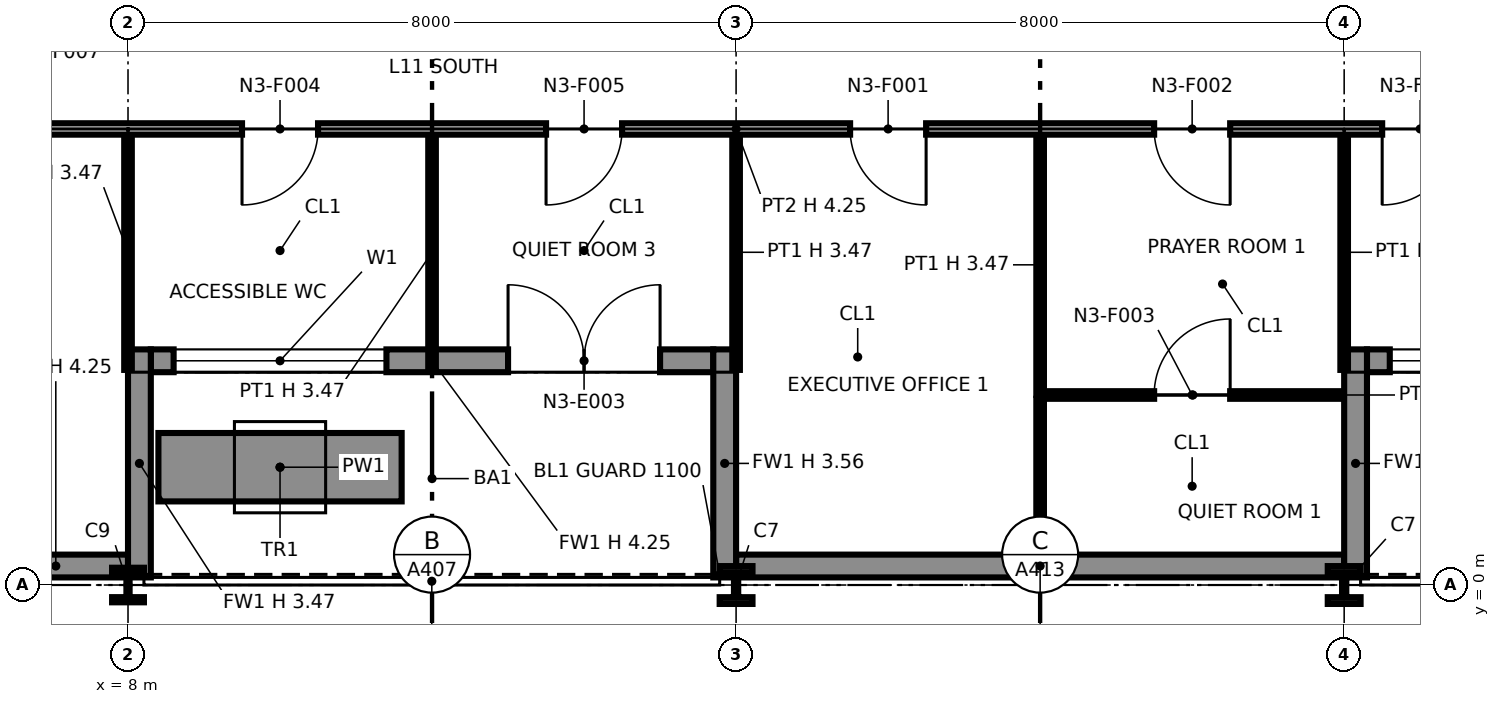
"""IFC4 building model, lengths in metres.
Left out: names, types, materials, properties, quantities, classifications, styles, units other than length and angle.
Written with IfcOpenShell. Run it as: python <this file> out.ifc"""

import sys

from ifc_helpers import new_model, si_unit, direction, frame, frame_2d, origin, origin_2d, place, context, subcontext, project, spatial, rectangle, i_section, extrude, element, fill, save


model = new_model("IFC4")
c1 = context("Model", 3, precision=1e-05, world=origin(), true_north=direction((0.0, 1.0)))
c2 = subcontext(c1, "Body", "Model", "MODEL_VIEW")
j1 = project(units=[si_unit("LENGTHUNIT", "METRE"), si_unit("PLANEANGLEUNIT", "RADIAN")], contexts=[c1])
p1 = place(None, origin())
s1 = spatial("IfcSite", under=j1, at=p1, CompositionType="ELEMENT")
p2 = place(p1, origin())
s2 = spatial("IfcBuilding", under=s1, at=p2, CompositionType="ELEMENT")
p3 = place(p2, frame((0.0, 0.0, 65.6)))
s3 = spatial("IfcBuildingStorey", under=s2, at=p3, CompositionType="ELEMENT", Elevation=65.6)
p4 = place(p3, frame((8.0, 0.0, 0.0), z_axis=(0.0, 0.0, 1.0), x_axis=(1.0, 0.0, 0.0)))
e1 = element("IfcColumn", 1, at=p4, inside=s3, PredefinedType="COLUMN", context=c2, shape_type="SweptSolid", body=[
    extrude(i_section(OverallWidth=0.419, OverallDepth=0.455, WebThickness=0.042, FlangeThickness=0.068, at=origin_2d()), origin(), (0.0, 0.0, 1.0), 4.25),
])
for number, where, z_axis, x_axis in (
    (2, (16.0, 0.0, 0.0), (0.0, 0.0, 1.0), (1.0, 0.0, 0.0)),
    (3, (24.0, 0.0, 0.0), (0.0, 0.0, 1.0), (1.0, 0.0, 0.0)),
):
    element("IfcColumn", number, at=place(p3, frame(where, z_axis=z_axis, x_axis=x_axis)), inside=s3, PredefinedType="COLUMN", context=c2, shape_type="SweptSolid", body=[
        extrude(i_section(OverallWidth=0.432, OverallDepth=0.498, WebThickness=0.056, FlangeThickness=0.089, at=origin_2d()), origin(), (0.0, 0.0, 1.0), 4.25),
    ])
p5 = place(p3, frame((6.1, 0.25, 0.0), z_axis=(0.0, 0.0, 1.0), x_axis=(1.0, 0.0, 0.0)))
e4 = element("IfcWall", 4, at=p5, inside=s3, PredefinedType="SOLIDWALL", context=c2, shape_type="SweptSolid", body=[
    extrude(rectangle(XDim=1.9, YDim=0.3, at=frame_2d((0.95, 0.0))), origin(), (0.0, 0.0, 1.0), 4.25),
])
p6 = place(p3, frame((8.3, 2.95, 0.0), z_axis=(0.0, 0.0, 1.0), x_axis=(1.0, 0.0, 0.0)))
e5 = element("IfcWall", 5, at=p6, inside=s3, PredefinedType="SOLIDWALL", context=c2, shape_type="SweptSolid", body=[
    extrude(rectangle(XDim=7.4, YDim=0.3, at=frame_2d((3.7, 0.0))), origin(), (0.0, 0.0, 1.0), 4.25),
])
p7 = place(p6, frame((0.3, 0.0, 0.9)))
e6 = element("IfcOpeningElement", 6, at=p7, cuts=e5, PredefinedType="OPENING", context=c2, shape_type="SweptSolid", body=[
    extrude(rectangle(XDim=2.8, YDim=2.2, at=frame_2d((1.4, 1.1))), frame((0.0, 0.16, 0.0), z_axis=(0.0, -1.0, 0.0), x_axis=(1.0, 0.0, 0.0)), (0.0, 0.0, 1.0), 0.32),
])
p8 = place(p6, frame((4.7, 0.0, 0.0)))
e7 = element("IfcOpeningElement", 7, at=p8, cuts=e5, PredefinedType="OPENING", context=c2, shape_type="SweptSolid", body=[
    extrude(rectangle(XDim=2.0, YDim=2.4, at=frame_2d((1.0, 1.2))), frame((0.0, 0.16, 0.0), z_axis=(0.0, -1.0, 0.0), x_axis=(1.0, 0.0, 0.0)), (0.0, 0.0, 1.0), 0.32),
])
p9 = place(p3, frame((8.15, 0.1, 0.0), z_axis=(0.0, 0.0, 1.0), x_axis=(0.0, 1.0, 0.0)))
e8 = element("IfcWall", 8, at=p9, inside=s3, PredefinedType="SOLIDWALL", context=c2, shape_type="SweptSolid", body=[
    extrude(rectangle(XDim=3.0, YDim=0.3, at=frame_2d((1.5, 0.0))), origin(), (0.0, 0.0, 1.0), 3.469),
])
p10 = place(p3, frame((15.85, 0.1, 0.0), z_axis=(0.0, 0.0, 1.0), x_axis=(0.0, 1.0, 0.0)))
e9 = element("IfcWall", 9, at=p10, inside=s3, PredefinedType="SOLIDWALL", context=c2, shape_type="SweptSolid", body=[
    extrude(rectangle(XDim=3.0, YDim=0.3, at=frame_2d((1.5, 0.0))), origin(), (0.0, 0.0, 1.0), 3.556),
])
p11 = place(p3, frame((16.0, 0.25, 0.0), z_axis=(0.0, 0.0, 1.0), x_axis=(1.0, 0.0, 0.0)))
e10 = element("IfcWall", 10, at=p11, inside=s3, PredefinedType="SOLIDWALL", context=c2, shape_type="SweptSolid", body=[
    extrude(rectangle(XDim=8.0, YDim=0.3, at=frame_2d((4.0, 0.0))), origin(), (0.0, 0.0, 1.0), 4.25),
])
p12 = place(p3, frame((24.3, 2.95, 0.0), z_axis=(0.0, 0.0, 1.0), x_axis=(1.0, 0.0, 0.0)))
e11 = element("IfcWall", 11, at=p12, inside=s3, PredefinedType="SOLIDWALL", context=c2, shape_type="SweptSolid", body=[
    extrude(rectangle(XDim=7.4, YDim=0.3, at=frame_2d((3.7, 0.0))), origin(), (0.0, 0.0, 1.0), 4.25),
])
p13 = place(p12, frame((0.3, 0.0, 0.9)))
e12 = element("IfcOpeningElement", 12, at=p13, cuts=e11, PredefinedType="OPENING", context=c2, shape_type="SweptSolid", body=[
    extrude(rectangle(XDim=2.8, YDim=2.2, at=frame_2d((1.4, 1.1))), frame((0.0, 0.16, 0.0), z_axis=(0.0, -1.0, 0.0), x_axis=(1.0, 0.0, 0.0)), (0.0, 0.0, 1.0), 0.32),
])
p14 = place(p12, frame((4.7, 0.0, 0.0)))
e13 = element("IfcOpeningElement", 13, at=p14, cuts=e11, PredefinedType="OPENING", context=c2, shape_type="SweptSolid", body=[
    extrude(rectangle(XDim=2.0, YDim=2.4, at=frame_2d((1.0, 1.2))), frame((0.0, 0.16, 0.0), z_axis=(0.0, -1.0, 0.0), x_axis=(1.0, 0.0, 0.0)), (0.0, 0.0, 1.0), 0.32),
])
p15 = place(p3, frame((24.15, 0.1, 0.0), z_axis=(0.0, 0.0, 1.0), x_axis=(0.0, 1.0, 0.0)))
e14 = element("IfcWall", 14, at=p15, inside=s3, PredefinedType="SOLIDWALL", context=c2, shape_type="SweptSolid", body=[
    extrude(rectangle(XDim=3.0, YDim=0.3, at=frame_2d((1.5, 0.0))), origin(), (0.0, 0.0, 1.0), 3.556),
])
p16 = place(p3, frame((8.4, 1.55, 0.0), z_axis=(0.0, 0.0, 1.0), x_axis=(1.0, 0.0, 0.0)))
e15 = element("IfcWall", 15, at=p16, inside=s3, PredefinedType="SOLIDWALL", context=c2, shape_type="SweptSolid", body=[
    extrude(rectangle(XDim=3.2, YDim=0.9, at=frame_2d((1.6, 0.0))), origin(), (0.0, 0.0, 1.0), 0.6),
])
p17 = place(p3, frame((20.0, 0.13, 0.0), z_axis=(0.0, 0.0, 1.0), x_axis=(0.0, 1.0, 0.0)))
e16 = element("IfcWall", 16, at=p17, inside=s3, PredefinedType="PARTITIONING", context=c2, shape_type="SweptSolid", body=[
    extrude(rectangle(XDim=2.32, YDim=0.1, at=frame_2d((1.16, 0.0))), origin(), (0.0, 0.0, 1.0), 4.25),
])
p18 = place(p3, frame((20.05, 2.5, 0.0), z_axis=(0.0, 0.0, 1.0), x_axis=(1.0, 0.0, 0.0)))
e17 = element("IfcWall", 17, at=p18, inside=s3, PredefinedType="PARTITIONING", context=c2, shape_type="SweptSolid", body=[
    extrude(rectangle(XDim=3.92, YDim=0.1, at=frame_2d((1.96, 0.0))), origin(), (0.0, 0.0, 1.0), 4.25),
])
p19 = place(p18, frame((1.45, 0.0, 0.0)))
e18 = element("IfcOpeningElement", 18, at=p19, cuts=e17, PredefinedType="OPENING", context=c2, shape_type="SweptSolid", body=[
    extrude(rectangle(XDim=1.0, YDim=2.1, at=frame_2d((0.5, 1.05))), frame((0.0, 0.06, 0.0), z_axis=(0.0, -1.0, 0.0), x_axis=(1.0, 0.0, 0.0)), (0.0, 0.0, 1.0), 0.12),
])
p20 = place(p3, frame((20.0, 2.5, 0.0), z_axis=(0.0, 0.0, 1.0), x_axis=(0.0, 1.0, 0.0)))
e19 = element("IfcWall", 19, at=p20, inside=s3, PredefinedType="PARTITIONING", context=c2, shape_type="SweptSolid", body=[
    extrude(rectangle(XDim=3.425, YDim=0.1, at=frame_2d((1.712, 0.0))), origin(), (0.0, 0.0, 1.0), 3.47),
])
for number, where, z_axis, x_axis in (
    (20, (8.0, 2.83, 0.0), (0.0, 0.0, 1.0), (0.0, 1.0, 0.0)),
    (21, (12.0, 2.83, 0.0), (0.0, 0.0, 1.0), (0.0, 1.0, 0.0)),
    (22, (16.0, 2.83, 0.0), (0.0, 0.0, 1.0), (0.0, 1.0, 0.0)),
    (23, (24.0, 2.83, 0.0), (0.0, 0.0, 1.0), (0.0, 1.0, 0.0)),
):
    element("IfcWall", number, at=place(p3, frame(where, z_axis=z_axis, x_axis=x_axis)), inside=s3, PredefinedType="PARTITIONING", context=c2, shape_type="SweptSolid", body=[
        extrude(rectangle(XDim=3.095, YDim=0.1, at=frame_2d((1.547, 0.0))), origin(), (0.0, 0.0, 1.0), 3.47),
    ])
p21 = place(p3, frame((6.075, 6.0, 0.0), z_axis=(0.0, 0.0, 1.0), x_axis=(1.0, 0.0, 0.0)))
e24 = element("IfcWall", 24, at=p21, inside=s3, PredefinedType="PARTITIONING", context=c2, shape_type="SweptSolid", body=[
    extrude(rectangle(XDim=19.85, YDim=0.15, at=frame_2d((9.925, 0.0))), origin(), (0.0, 0.0, 1.0), 4.25),
])
p22 = place(p21, frame((12.425, 0.0, 0.0), z_axis=(0.0, 0.0, 1.0), x_axis=(-1.0, 0.0, 0.0)))
e25 = element("IfcOpeningElement", 25, at=p22, cuts=e24, PredefinedType="OPENING", context=c2, shape_type="SweptSolid", body=[
    extrude(rectangle(XDim=1.0, YDim=2.1, at=frame_2d((0.5, 1.05))), frame((0.0, 0.085, 0.0), z_axis=(0.0, -1.0, 0.0), x_axis=(1.0, 0.0, 0.0)), (0.0, 0.0, 1.0), 0.17),
])
p23 = place(p21, frame((16.425, 0.0, 0.0), z_axis=(0.0, 0.0, 1.0), x_axis=(-1.0, 0.0, 0.0)))
e26 = element("IfcOpeningElement", 26, at=p23, cuts=e24, PredefinedType="OPENING", context=c2, shape_type="SweptSolid", body=[
    extrude(rectangle(XDim=1.0, YDim=2.1, at=frame_2d((0.5, 1.05))), frame((0.0, 0.085, 0.0), z_axis=(0.0, -1.0, 0.0), x_axis=(1.0, 0.0, 0.0)), (0.0, 0.0, 1.0), 0.17),
])
p24 = place(p21, frame((4.425, 0.0, 0.0), z_axis=(0.0, 0.0, 1.0), x_axis=(-1.0, 0.0, 0.0)))
e27 = element("IfcOpeningElement", 27, at=p24, cuts=e24, PredefinedType="OPENING", context=c2, shape_type="SweptSolid", body=[
    extrude(rectangle(XDim=1.0, YDim=2.1, at=frame_2d((0.5, 1.05))), frame((0.0, 0.085, 0.0), z_axis=(0.0, -1.0, 0.0), x_axis=(1.0, 0.0, 0.0)), (0.0, 0.0, 1.0), 0.17),
])
p25 = place(p21, frame((8.425, 0.0, 0.0), z_axis=(0.0, 0.0, 1.0), x_axis=(-1.0, 0.0, 0.0)))
e28 = element("IfcOpeningElement", 28, at=p25, cuts=e24, PredefinedType="OPENING", context=c2, shape_type="SweptSolid", body=[
    extrude(rectangle(XDim=1.0, YDim=2.1, at=frame_2d((0.5, 1.05))), frame((0.0, 0.085, 0.0), z_axis=(0.0, -1.0, 0.0), x_axis=(1.0, 0.0, 0.0)), (0.0, 0.0, 1.0), 0.17),
])
p26 = place(p21, frame((19.425, 0.0, 0.0), z_axis=(0.0, 0.0, 1.0), x_axis=(-1.0, 0.0, 0.0)))
e29 = element("IfcOpeningElement", 29, at=p26, cuts=e24, PredefinedType="OPENING", context=c2, shape_type="SweptSolid", body=[
    extrude(rectangle(XDim=1.0, YDim=2.1, at=frame_2d((0.5, 1.05))), frame((0.0, 0.085, 0.0), z_axis=(0.0, -1.0, 0.0), x_axis=(1.0, 0.0, 0.0)), (0.0, 0.0, 1.0), 0.17),
])
p27 = place(p7, origin())
e30 = element("IfcWindow", 30, at=p27, inside=s3, PartitioningType="SINGLE_PANEL", PredefinedType="WINDOW", context=c2, shape_type="SweptSolid", body=[
    extrude(rectangle(XDim=2.8, YDim=2.2, at=frame_2d((1.4, 1.1))), frame((0.0, 0.03, 0.0), z_axis=(0.0, -1.0, 0.0), x_axis=(1.0, 0.0, 0.0)), (0.0, 0.0, 1.0), 0.06),
])
fill(e6, e30)
p28 = place(p8, origin())
e31 = element("IfcDoor", 31, at=p28, inside=s3, OperationType="DOUBLE_DOOR_SINGLE_SWING", PredefinedType="DOOR", context=c2, shape_type="SweptSolid", body=[
    extrude(rectangle(XDim=2.0, YDim=2.4, at=frame_2d((1.0, 1.2))), frame((0.0, 0.025, 0.0), z_axis=(0.0, -1.0, 0.0), x_axis=(1.0, 0.0, 0.0)), (0.0, 0.0, 1.0), 0.05),
])
fill(e7, e31)
p29 = place(p13, origin())
e32 = element("IfcWindow", 32, at=p29, inside=s3, PartitioningType="SINGLE_PANEL", PredefinedType="WINDOW", context=c2, shape_type="SweptSolid", body=[
    extrude(rectangle(XDim=2.8, YDim=2.2, at=frame_2d((1.4, 1.1))), frame((0.0, 0.03, 0.0), z_axis=(0.0, -1.0, 0.0), x_axis=(1.0, 0.0, 0.0)), (0.0, 0.0, 1.0), 0.06),
])
fill(e12, e32)
p30 = place(p22, origin())
e33 = element("IfcDoor", 33, at=p30, inside=s3, OperationType="SINGLE_SWING_LEFT", PredefinedType="DOOR", context=c2, shape_type="SweptSolid", body=[
    extrude(rectangle(XDim=1.0, YDim=2.1, at=frame_2d((0.5, 1.05))), frame((0.0, 0.025, 0.0), z_axis=(0.0, -1.0, 0.0), x_axis=(1.0, 0.0, 0.0)), (0.0, 0.0, 1.0), 0.05),
])
fill(e25, e33)
p31 = place(p23, origin())
e34 = element("IfcDoor", 34, at=p31, inside=s3, OperationType="SINGLE_SWING_LEFT", PredefinedType="DOOR", context=c2, shape_type="SweptSolid", body=[
    extrude(rectangle(XDim=1.0, YDim=2.1, at=frame_2d((0.5, 1.05))), frame((0.0, 0.025, 0.0), z_axis=(0.0, -1.0, 0.0), x_axis=(1.0, 0.0, 0.0)), (0.0, 0.0, 1.0), 0.05),
])
fill(e26, e34)
p32 = place(p19, origin())
e35 = element("IfcDoor", 35, at=p32, inside=s3, OperationType="SINGLE_SWING_RIGHT", PredefinedType="DOOR", context=c2, shape_type="SweptSolid", body=[
    extrude(rectangle(XDim=1.0, YDim=2.1, at=frame_2d((0.5, 1.05))), frame((0.0, 0.025, 0.0), z_axis=(0.0, -1.0, 0.0), x_axis=(1.0, 0.0, 0.0)), (0.0, 0.0, 1.0), 0.05),
])
fill(e18, e35)
p33 = place(p24, origin())
e36 = element("IfcDoor", 36, at=p33, inside=s3, OperationType="SINGLE_SWING_RIGHT", PredefinedType="DOOR", context=c2, shape_type="SweptSolid", body=[
    extrude(rectangle(XDim=1.0, YDim=2.1, at=frame_2d((0.5, 1.05))), frame((0.0, 0.025, 0.0), z_axis=(0.0, -1.0, 0.0), x_axis=(1.0, 0.0, 0.0)), (0.0, 0.0, 1.0), 0.05),
])
fill(e27, e36)
p34 = place(p25, origin())
e37 = element("IfcDoor", 37, at=p34, inside=s3, OperationType="SINGLE_SWING_RIGHT", PredefinedType="DOOR", context=c2, shape_type="SweptSolid", body=[
    extrude(rectangle(XDim=1.0, YDim=2.1, at=frame_2d((0.5, 1.05))), frame((0.0, 0.025, 0.0), z_axis=(0.0, -1.0, 0.0), x_axis=(1.0, 0.0, 0.0)), (0.0, 0.0, 1.0), 0.05),
])
fill(e28, e37)
p35 = place(p26, origin())
e38 = element("IfcDoor", 38, at=p35, inside=s3, OperationType="SINGLE_SWING_RIGHT", PredefinedType="DOOR", context=c2, shape_type="SweptSolid", body=[
    extrude(rectangle(XDim=1.0, YDim=2.1, at=frame_2d((0.5, 1.05))), frame((0.0, 0.025, 0.0), z_axis=(0.0, -1.0, 0.0), x_axis=(1.0, 0.0, 0.0)), (0.0, 0.0, 1.0), 0.05),
])
fill(e29, e38)
save(model, sys.argv[1])
